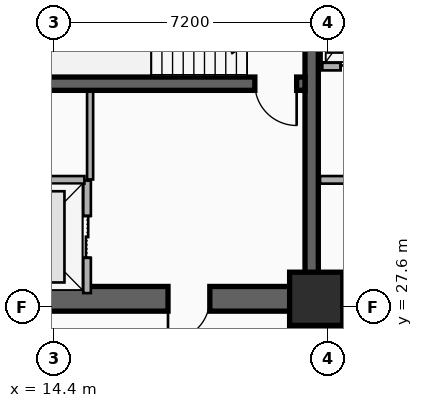
"""IFC4 building model, lengths in metres.
Left out: names, types, materials, properties, quantities, classifications, styles, units other than length and angle.
Written with IfcOpenShell. Run it as: python <this file> out.ifc"""

import sys

from ifc_helpers import new_model, si_unit, direction, frame, frame_2d, origin, origin_2d, place, context, subcontext, project, spatial, rectangle, extrude, element, fill, save


model = new_model("IFC4")
c1 = context("Model", 3, precision=1e-05, world=origin(), true_north=direction((0.0, 1.0)))
c2 = subcontext(c1, "Body", "Model", "MODEL_VIEW")
j1 = project(units=[si_unit("LENGTHUNIT", "METRE"), si_unit("PLANEANGLEUNIT", "RADIAN")], contexts=[c1])
p1 = place(None, origin())
s1 = spatial("IfcSite", under=j1, at=p1, CompositionType="ELEMENT")
p2 = place(p1, origin())
s2 = spatial("IfcBuilding", under=s1, at=p2, CompositionType="ELEMENT")
p3 = place(p2, frame((0.0, 0.0, 86.3)))
s3 = spatial("IfcBuildingStorey", under=s2, at=p3, CompositionType="ELEMENT", Elevation=86.3)
p4 = place(p3, frame((21.18, 27.82, 0.0), z_axis=(0.0, 0.0, 1.0), x_axis=(-1.0, 0.0, 0.0)))
e1 = element("IfcWall", 1, at=p4, inside=s3, PredefinedType="SHEAR", context=c2, shape_type="SweptSolid", body=[
    extrude(rectangle(XDim=9.03, YDim=0.65, at=frame_2d((4.515, 0.0))), origin(), (0.0, 0.0, 1.0), 3.5),
])
p5 = place(p4, frame((2.68, 0.0, 0.0)))
e2 = element("IfcOpeningElement", 2, at=p5, cuts=e1, PredefinedType="OPENING", context=c2, shape_type="SweptSolid", body=[
    extrude(rectangle(XDim=1.1, YDim=2.15, at=frame_2d((0.55, 1.075))), frame((0.0, 0.335, 0.0), z_axis=(0.0, -1.0, 0.0), x_axis=(1.0, 0.0, 0.0)), (0.0, 0.0, 1.0), 0.67),
])
p6 = place(p3, frame((33.15, 27.82, 0.0), z_axis=(0.0, 0.0, 1.0), x_axis=(-1.0, 0.0, 0.0)))
e3 = element("IfcWall", 3, at=p6, inside=s3, PredefinedType="SHEAR", context=c2, shape_type="SweptSolid", body=[
    extrude(rectangle(XDim=11.97, YDim=0.65, at=frame_2d((5.985, 0.0))), origin(), (0.0, 0.0, 1.0), 3.5),
])
p7 = place(p6, frame((6.1, 0.0, 0.0)))
e4 = element("IfcOpeningElement", 4, at=p7, cuts=e3, PredefinedType="OPENING", context=c2, shape_type="SweptSolid", body=[
    extrude(rectangle(XDim=1.6, YDim=2.2, at=frame_2d((0.8, 1.1))), frame((0.0, 0.335, 0.0), z_axis=(0.0, -1.0, 0.0), x_axis=(1.0, 0.0, 0.0)), (0.0, 0.0, 1.0), 0.67),
])
p8 = place(p3, frame((21.18, 28.145, 0.0), z_axis=(0.0, 0.0, 1.0), x_axis=(0.0, 1.0, 0.0)))
e5 = element("IfcWall", 5, at=p8, inside=s3, PredefinedType="SHEAR", context=c2, shape_type="SweptSolid", body=[
    extrude(rectangle(XDim=8.58, YDim=0.35, at=frame_2d((4.29, 0.0))), origin(), (0.0, 0.0, 1.0), 3.5),
])
p9 = place(p3, frame((21.005, 33.48, 0.0), z_axis=(0.0, 0.0, 1.0), x_axis=(-1.0, 0.0, 0.0)))
e6 = element("IfcWall", 6, at=p9, inside=s3, PredefinedType="SHEAR", context=c2, shape_type="SweptSolid", body=[
    extrude(rectangle(XDim=8.53, YDim=0.35, at=frame_2d((4.265, 0.0))), origin(), (0.0, 0.0, 1.0), 3.5),
])
p10 = place(p9, frame((0.22, 0.0, 0.0)))
e7 = element("IfcOpeningElement", 7, at=p10, cuts=e6, PredefinedType="OPENING", context=c2, shape_type="SweptSolid", body=[
    extrude(rectangle(XDim=1.1, YDim=2.15, at=frame_2d((0.55, 1.075))), frame((0.0, 0.185, 0.0), z_axis=(0.0, -1.0, 0.0), x_axis=(1.0, 0.0, 0.0)), (0.0, 0.0, 1.0), 0.37),
])
p11 = place(p3, frame((21.3, 27.82, 0.0), z_axis=(0.0, 0.0, 1.0), x_axis=(1.0, 0.0, 0.0)))
e8 = element("IfcColumn", 8, at=p11, inside=s3, PredefinedType="COLUMN", context=c2, shape_type="SweptSolid", body=[
    extrude(rectangle(XDim=1.4, YDim=1.4, at=origin_2d()), origin(), (0.0, 0.0, 1.0), 3.5),
])
p12 = place(p3, frame((15.27, 27.97, 0.0), z_axis=(0.0, 0.0, 1.0), x_axis=(0.0, 1.0, 0.0)))
e9 = element("IfcWall", 9, at=p12, inside=s3, PredefinedType="PARTITIONING", context=c2, shape_type="SweptSolid", body=[
    extrude(rectangle(XDim=2.96, YDim=0.2, at=frame_2d((1.48, 0.0))), origin(), (0.0, 0.0, 1.0), 2.212),
])
p13 = place(p12, frame((0.93, 0.0, 0.0)))
e10 = element("IfcOpeningElement", 10, at=p13, cuts=e9, PredefinedType="OPENING", context=c2, shape_type="SweptSolid", body=[
    extrude(rectangle(XDim=1.1, YDim=2.15, at=frame_2d((0.55, 1.075))), frame((0.0, 0.11, 0.0), z_axis=(0.0, -1.0, 0.0), x_axis=(1.0, 0.0, 0.0)), (0.0, 0.0, 1.0), 0.22),
])
p14 = place(p3, frame((12.45, 30.95, 0.0), z_axis=(0.0, 0.0, 1.0), x_axis=(1.0, 0.0, 0.0)))
e11 = element("IfcWall", 11, at=p14, inside=s3, PredefinedType="PARTITIONING", context=c2, shape_type="SweptSolid", body=[
    extrude(rectangle(XDim=2.75, YDim=0.2, at=frame_2d((1.375, 0.0))), origin(), (0.0, 0.0, 1.0), 2.212),
])
p15 = place(p3, frame((21.46, 33.93, 0.0), z_axis=(0.0, 0.0, 1.0), x_axis=(1.0, 0.0, 0.0)))
e12 = element("IfcWall", 12, at=p15, inside=s3, PredefinedType="PARTITIONING", context=c2, shape_type="SweptSolid", body=[
    extrude(rectangle(XDim=2.065, YDim=0.2, at=frame_2d((1.032, 0.0))), origin(), (0.0, 0.0, 1.0), 2.212),
])
p16 = place(p15, frame((0.482, 0.0, 0.0)))
e13 = element("IfcOpeningElement", 13, at=p16, cuts=e12, PredefinedType="OPENING", context=c2, shape_type="SweptSolid", body=[
    extrude(rectangle(XDim=1.1, YDim=2.15, at=frame_2d((0.55, 1.075))), frame((0.0, 0.11, 0.0), z_axis=(0.0, -1.0, 0.0), x_axis=(1.0, 0.0, 0.0)), (0.0, 0.0, 1.0), 0.22),
])
p17 = place(p3, frame((21.4, 30.95, 0.0), z_axis=(0.0, 0.0, 1.0), x_axis=(1.0, 0.0, 0.0)))
e14 = element("IfcWall", 14, at=p17, inside=s3, PredefinedType="PARTITIONING", context=c2, shape_type="SweptSolid", body=[
    extrude(rectangle(XDim=3.46, YDim=0.2, at=frame_2d((1.73, 0.0))), origin(), (0.0, 0.0, 1.0), 2.28),
])
p18 = place(p17, frame((1.13, 0.0, 0.0)))
e15 = element("IfcOpeningElement", 15, at=p18, cuts=e14, PredefinedType="OPENING", context=c2, shape_type="SweptSolid", body=[
    extrude(rectangle(XDim=1.2, YDim=2.15, at=frame_2d((0.6, 1.075))), frame((0.0, 0.11, 0.0), z_axis=(0.0, -1.0, 0.0), x_axis=(1.0, 0.0, 0.0)), (0.0, 0.0, 1.0), 0.22),
])
p19 = place(p3, frame((15.35, 30.96, 0.0), z_axis=(0.0, 0.0, 1.0), x_axis=(0.0, 1.0, 0.0)))
e16 = element("IfcWall", 16, at=p19, inside=s3, PredefinedType="PARTITIONING", context=c2, shape_type="SweptSolid", body=[
    extrude(rectangle(XDim=2.31, YDim=0.16, at=frame_2d((1.155, 0.0))), origin(), (0.0, 0.0, 1.0), 3.24),
])
p20 = place(p13, origin())
e17 = element("IfcDoor", 17, at=p20, inside=s3, OperationType="DOUBLE_DOOR_SLIDING", PredefinedType="DOOR", context=c2, shape_type="SweptSolid", body=[
    extrude(rectangle(XDim=1.1, YDim=2.15, at=frame_2d((0.55, 1.075))), frame((0.0, 0.025, 0.0), z_axis=(0.0, -1.0, 0.0), x_axis=(1.0, 0.0, 0.0)), (0.0, 0.0, 1.0), 0.05),
])
fill(e10, e17)
p21 = place(p16, origin())
e18 = element("IfcDoor", 18, at=p21, inside=s3, OperationType="DOUBLE_DOOR_SLIDING", PredefinedType="DOOR", context=c2, shape_type="SweptSolid", body=[
    extrude(rectangle(XDim=1.1, YDim=2.15, at=frame_2d((0.55, 1.075))), frame((0.0, 0.025, 0.0), z_axis=(0.0, -1.0, 0.0), x_axis=(1.0, 0.0, 0.0)), (0.0, 0.0, 1.0), 0.05),
])
fill(e13, e18)
p22 = place(p10, origin())
e19 = element("IfcDoor", 19, at=p22, inside=s3, OperationType="SINGLE_SWING_LEFT", PredefinedType="DOOR", context=c2, shape_type="SweptSolid", body=[
    extrude(rectangle(XDim=1.1, YDim=2.15, at=frame_2d((0.55, 1.075))), frame((0.0, 0.025, 0.0), z_axis=(0.0, -1.0, 0.0), x_axis=(1.0, 0.0, 0.0)), (0.0, 0.0, 1.0), 0.05),
])
fill(e7, e19)
p23 = place(p5, origin())
e20 = element("IfcDoor", 20, at=p23, inside=s3, OperationType="SINGLE_SWING_RIGHT", PredefinedType="DOOR", context=c2, shape_type="SweptSolid", body=[
    extrude(rectangle(XDim=1.1, YDim=2.15, at=frame_2d((0.55, 1.075))), frame((0.0, 0.025, 0.0), z_axis=(0.0, -1.0, 0.0), x_axis=(1.0, 0.0, 0.0)), (0.0, 0.0, 1.0), 0.05),
])
fill(e2, e20)
save(model, sys.argv[1])
